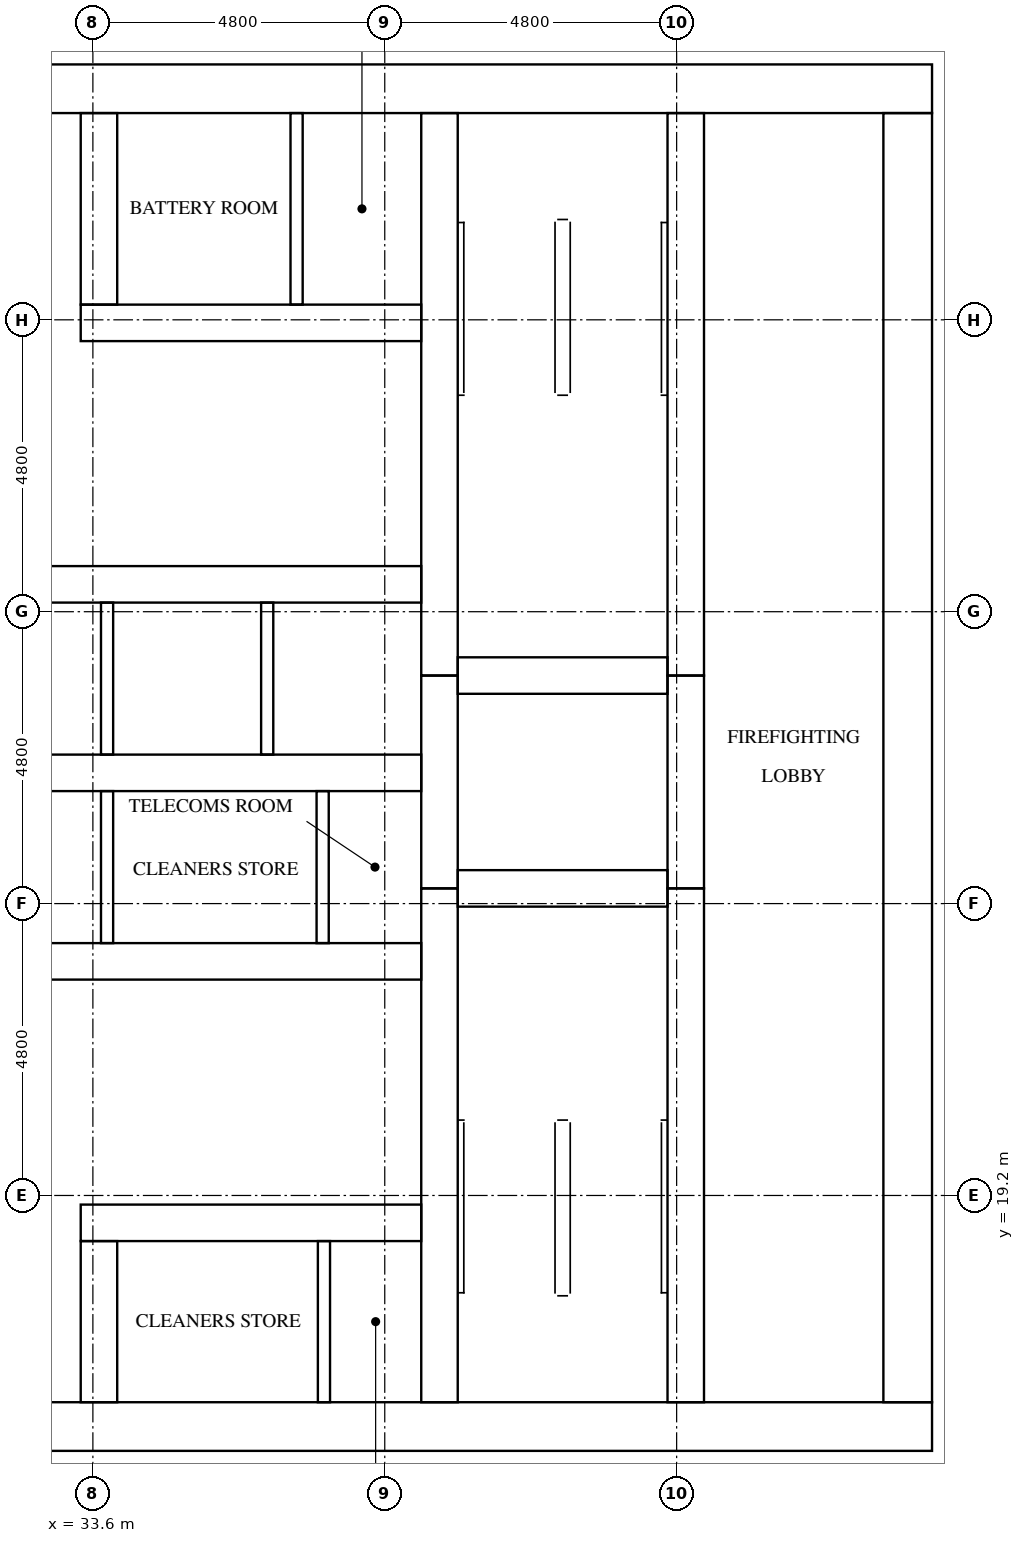
"""IFC4 building model, lengths in metres.
Left out: names, types, materials, properties, quantities, classifications, styles, units other than length and angle.
Written with IfcOpenShell. Run it as: python <this file> out.ifc"""

import sys

from ifc_helpers import new_model, si_unit, direction, frame, frame_2d, origin, place, context, subcontext, project, spatial, rectangle, extrude, element, fill, save


model = new_model("IFC4")
c1 = context("Model", 3, precision=1e-05, world=origin(), true_north=direction((0.0, 1.0)))
c2 = subcontext(c1, "Body", "Model", "MODEL_VIEW")
j1 = project(units=[si_unit("LENGTHUNIT", "METRE"), si_unit("PLANEANGLEUNIT", "RADIAN")], contexts=[c1])
p1 = place(None, origin())
s1 = spatial("IfcSite", under=j1, at=p1, CompositionType="ELEMENT")
p2 = place(p1, origin())
s2 = spatial("IfcBuilding", under=s1, at=p2, CompositionType="ELEMENT")
p3 = place(p2, frame((0.0, 0.0, 159.5)))
s3 = spatial("IfcBuildingStorey", under=s2, at=p3, CompositionType="ELEMENT", Elevation=159.5)
p4 = place(p3, frame((15.0, 15.4, 0.0), z_axis=(0.0, 0.0, 1.0), x_axis=(1.0, 0.0, 0.0)))
e1 = element("IfcWall", 1, at=p4, inside=s3, PredefinedType="SHEAR", context=c2, shape_type="SweptSolid", body=[
    extrude(rectangle(XDim=32.4, YDim=0.8, at=frame_2d((16.2, 0.0))), origin(), (0.0, 0.0, 1.0), 3.2),
])
p5 = place(p4, frame((15.3, 0.0, 0.0)))
e2 = element("IfcOpeningElement", 2, at=p5, cuts=e1, PredefinedType="OPENING", context=c2, shape_type="SweptSolid", body=[
    extrude(rectangle(XDim=1.8, YDim=2.1, at=frame_2d((0.9, 1.05))), frame((0.0, 0.41, 0.0), z_axis=(0.0, -1.0, 0.0), x_axis=(1.0, 0.0, 0.0)), (0.0, 0.0, 1.0), 0.82),
])
p6 = place(p3, frame((15.0, 37.4, 0.0), z_axis=(0.0, 0.0, 1.0), x_axis=(1.0, 0.0, 0.0)))
e3 = element("IfcWall", 3, at=p6, inside=s3, PredefinedType="SHEAR", context=c2, shape_type="SweptSolid", body=[
    extrude(rectangle(XDim=32.4, YDim=0.8, at=frame_2d((16.2, 0.0))), origin(), (0.0, 0.0, 1.0), 3.2),
])
p7 = place(p6, frame((15.3, 0.0, 0.0)))
e4 = element("IfcOpeningElement", 4, at=p7, cuts=e3, PredefinedType="OPENING", context=c2, shape_type="SweptSolid", body=[
    extrude(rectangle(XDim=1.8, YDim=2.1, at=frame_2d((0.9, 1.05))), frame((0.0, 0.41, 0.0), z_axis=(0.0, -1.0, 0.0), x_axis=(1.0, 0.0, 0.0)), (0.0, 0.0, 1.0), 0.82),
])
p8 = place(p6, frame((1.51, 0.0, 0.0)))
e5 = element("IfcOpeningElement", 5, at=p8, cuts=e3, PredefinedType="OPENING", context=c2, shape_type="SweptSolid", body=[
    extrude(rectangle(XDim=1.0, YDim=2.1, at=frame_2d((0.5, 1.05))), frame((0.0, 0.41, 0.0), z_axis=(0.0, -1.0, 0.0), x_axis=(1.0, 0.0, 0.0)), (0.0, 0.0, 1.0), 0.82),
])
p9 = place(p6, frame((5.11, 0.0, 0.0)))
e6 = element("IfcOpeningElement", 6, at=p9, cuts=e3, PredefinedType="OPENING", context=c2, shape_type="SweptSolid", body=[
    extrude(rectangle(XDim=1.0, YDim=2.1, at=frame_2d((0.5, 1.05))), frame((0.0, 0.41, 0.0), z_axis=(0.0, -1.0, 0.0), x_axis=(1.0, 0.0, 0.0)), (0.0, 0.0, 1.0), 0.82),
])
p10 = place(p3, frame((47.0, 15.8, 0.0), z_axis=(0.0, 0.0, 1.0), x_axis=(0.0, 1.0, 0.0)))
e7 = element("IfcWall", 7, at=p10, inside=s3, PredefinedType="SHEAR", context=c2, shape_type="SweptSolid", body=[
    extrude(rectangle(XDim=21.2, YDim=0.8, at=frame_2d((10.6, 0.0))), origin(), (0.0, 0.0, 1.0), 3.2),
])
p11 = place(p10, frame((10.3, 0.0, 0.0)))
e8 = element("IfcOpeningElement", 8, at=p11, cuts=e7, PredefinedType="OPENING", context=c2, shape_type="SweptSolid", body=[
    extrude(rectangle(XDim=1.2, YDim=2.1, at=frame_2d((0.6, 1.05))), frame((0.0, 0.41, 0.0), z_axis=(0.0, -1.0, 0.0), x_axis=(1.0, 0.0, 0.0)), (0.0, 0.0, 1.0), 0.82),
])
p12 = place(p3, frame((39.3, 15.8, 0.0), z_axis=(0.0, 0.0, 1.0), x_axis=(0.0, 1.0, 0.0)))
e9 = element("IfcWall", 9, at=p12, inside=s3, PredefinedType="SHEAR", context=c2, shape_type="SweptSolid", body=[
    extrude(rectangle(XDim=8.45, YDim=0.6, at=frame_2d((4.225, 0.0))), origin(), (0.0, 0.0, 1.0), 3.2),
])
p13 = place(p3, frame((39.3, 24.25, 0.0), z_axis=(0.0, 0.0, 1.0), x_axis=(0.0, 1.0, 0.0)))
e10 = element("IfcWall", 10, at=p13, inside=s3, PredefinedType="SHEAR", context=c2, shape_type="SweptSolid", body=[
    extrude(rectangle(XDim=3.5, YDim=0.6, at=frame_2d((1.75, 0.0))), origin(), (0.0, 0.0, 1.0), 3.2),
])
p14 = place(p3, frame((39.3, 27.75, 0.0), z_axis=(0.0, 0.0, 1.0), x_axis=(0.0, 1.0, 0.0)))
e11 = element("IfcWall", 11, at=p14, inside=s3, PredefinedType="SHEAR", context=c2, shape_type="SweptSolid", body=[
    extrude(rectangle(XDim=9.25, YDim=0.6, at=frame_2d((4.625, 0.0))), origin(), (0.0, 0.0, 1.0), 3.2),
])
p15 = place(p3, frame((43.35, 15.8, 0.0), z_axis=(0.0, 0.0, 1.0), x_axis=(0.0, 1.0, 0.0)))
e12 = element("IfcWall", 12, at=p15, inside=s3, PredefinedType="SHEAR", context=c2, shape_type="SweptSolid", body=[
    extrude(rectangle(XDim=8.45, YDim=0.6, at=frame_2d((4.225, 0.0))), origin(), (0.0, 0.0, 1.0), 3.2),
])
p16 = place(p15, frame((0.4, 0.0, 0.0)))
e13 = element("IfcOpeningElement", 13, at=p16, cuts=e12, PredefinedType="OPENING", context=c2, shape_type="SweptSolid", body=[
    extrude(rectangle(XDim=1.2, YDim=2.1, at=frame_2d((0.6, 1.05))), frame((0.0, 0.31, 0.0), z_axis=(0.0, -1.0, 0.0), x_axis=(1.0, 0.0, 0.0)), (0.0, 0.0, 1.0), 0.62),
])
p17 = place(p3, frame((43.35, 24.25, 0.0), z_axis=(0.0, 0.0, 1.0), x_axis=(0.0, 1.0, 0.0)))
e14 = element("IfcWall", 14, at=p17, inside=s3, PredefinedType="SHEAR", context=c2, shape_type="SweptSolid", body=[
    extrude(rectangle(XDim=3.5, YDim=0.6, at=frame_2d((1.75, 0.0))), origin(), (0.0, 0.0, 1.0), 3.2),
])
p18 = place(p17, frame((1.2, 0.0, 0.0)))
e15 = element("IfcOpeningElement", 15, at=p18, cuts=e14, PredefinedType="OPENING", context=c2, shape_type="SweptSolid", body=[
    extrude(rectangle(XDim=1.1, YDim=2.1, at=frame_2d((0.55, 1.05))), frame((0.0, 0.31, 0.0), z_axis=(0.0, -1.0, 0.0), x_axis=(1.0, 0.0, 0.0)), (0.0, 0.0, 1.0), 0.62),
])
p19 = place(p3, frame((43.35, 27.75, 0.0), z_axis=(0.0, 0.0, 1.0), x_axis=(0.0, 1.0, 0.0)))
e16 = element("IfcWall", 16, at=p19, inside=s3, PredefinedType="SHEAR", context=c2, shape_type="SweptSolid", body=[
    extrude(rectangle(XDim=9.25, YDim=0.6, at=frame_2d((4.625, 0.0))), origin(), (0.0, 0.0, 1.0), 3.2),
])
p20 = place(p19, frame((7.65, 0.0, 0.0)))
e17 = element("IfcOpeningElement", 17, at=p20, cuts=e16, PredefinedType="OPENING", context=c2, shape_type="SweptSolid", body=[
    extrude(rectangle(XDim=1.2, YDim=2.1, at=frame_2d((0.6, 1.05))), frame((0.0, 0.31, 0.0), z_axis=(0.0, -1.0, 0.0), x_axis=(1.0, 0.0, 0.0)), (0.0, 0.0, 1.0), 0.62),
])
for number, where, z_axis, x_axis in (
    (18, (39.6, 24.25, 0.0), (0.0, 0.0, 1.0), (1.0, 0.0, 0.0)),
    (19, (39.6, 27.75, 0.0), (0.0, 0.0, 1.0), (1.0, 0.0, 0.0)),
):
    element("IfcWall", number, at=place(p3, frame(where, z_axis=z_axis, x_axis=x_axis)), inside=s3, PredefinedType="SHEAR", context=c2, shape_type="SweptSolid", body=[
        extrude(rectangle(XDim=3.45, YDim=0.6, at=frame_2d((1.725, 0.0))), origin(), (0.0, 0.0, 1.0), 3.2),
    ])
p21 = place(p3, frame((33.4, 18.75, 0.0), z_axis=(0.0, 0.0, 1.0), x_axis=(1.0, 0.0, 0.0)))
e20 = element("IfcWall", 20, at=p21, inside=s3, PredefinedType="SHEAR", context=c2, shape_type="SweptSolid", body=[
    extrude(rectangle(XDim=5.6, YDim=0.6, at=frame_2d((2.8, 0.0))), origin(), (0.0, 0.0, 1.0), 3.2),
])
p22 = place(p21, frame((1.75, 0.0, 0.0)))
e21 = element("IfcOpeningElement", 21, at=p22, cuts=e20, PredefinedType="OPENING", context=c2, shape_type="SweptSolid", body=[
    extrude(rectangle(XDim=1.0, YDim=2.1, at=frame_2d((0.5, 1.05))), frame((0.0, 0.31, 0.0), z_axis=(0.0, -1.0, 0.0), x_axis=(1.0, 0.0, 0.0)), (0.0, 0.0, 1.0), 0.62),
])
p23 = place(p21, frame((4.35, 0.0, 0.0)))
e22 = element("IfcOpeningElement", 22, at=p23, cuts=e20, PredefinedType="OPENING", context=c2, shape_type="SweptSolid", body=[
    extrude(rectangle(XDim=1.0, YDim=2.1, at=frame_2d((0.5, 1.05))), frame((0.0, 0.31, 0.0), z_axis=(0.0, -1.0, 0.0), x_axis=(1.0, 0.0, 0.0)), (0.0, 0.0, 1.0), 0.62),
])
p24 = place(p3, frame((23.4, 23.05, 0.0), z_axis=(0.0, 0.0, 1.0), x_axis=(1.0, 0.0, 0.0)))
e23 = element("IfcWall", 23, at=p24, inside=s3, PredefinedType="SHEAR", context=c2, shape_type="SweptSolid", body=[
    extrude(rectangle(XDim=15.6, YDim=0.6, at=frame_2d((7.8, 0.0))), origin(), (0.0, 0.0, 1.0), 3.2),
])
p25 = place(p24, frame((2.033, 0.0, 0.0)))
e24 = element("IfcOpeningElement", 24, at=p25, cuts=e23, PredefinedType="OPENING", context=c2, shape_type="SweptSolid", body=[
    extrude(rectangle(XDim=1.0, YDim=2.1, at=frame_2d((0.5, 1.05))), frame((0.0, 0.31, 0.0), z_axis=(0.0, -1.0, 0.0), x_axis=(1.0, 0.0, 0.0)), (0.0, 0.0, 1.0), 0.62),
])
p26 = place(p24, frame((11.706, 0.0, 0.0)))
e25 = element("IfcOpeningElement", 25, at=p26, cuts=e23, PredefinedType="OPENING", context=c2, shape_type="SweptSolid", body=[
    extrude(rectangle(XDim=1.0, YDim=2.1, at=frame_2d((0.5, 1.05))), frame((0.0, 0.31, 0.0), z_axis=(0.0, -1.0, 0.0), x_axis=(1.0, 0.0, 0.0)), (0.0, 0.0, 1.0), 0.62),
])
p27 = place(p24, frame((14.339, 0.0, 0.0)))
e26 = element("IfcOpeningElement", 26, at=p27, cuts=e23, PredefinedType="OPENING", context=c2, shape_type="SweptSolid", body=[
    extrude(rectangle(XDim=1.0, YDim=2.1, at=frame_2d((0.5, 1.05))), frame((0.0, 0.31, 0.0), z_axis=(0.0, -1.0, 0.0), x_axis=(1.0, 0.0, 0.0)), (0.0, 0.0, 1.0), 0.62),
])
p28 = place(p3, frame((23.4, 26.15, 0.0), z_axis=(0.0, 0.0, 1.0), x_axis=(1.0, 0.0, 0.0)))
e27 = element("IfcWall", 27, at=p28, inside=s3, PredefinedType="SHEAR", context=c2, shape_type="SweptSolid", body=[
    extrude(rectangle(XDim=15.6, YDim=0.6, at=frame_2d((7.8, 0.0))), origin(), (0.0, 0.0, 1.0), 3.2),
])
p29 = place(p3, frame((23.4, 29.25, 0.0), z_axis=(0.0, 0.0, 1.0), x_axis=(1.0, 0.0, 0.0)))
e28 = element("IfcWall", 28, at=p29, inside=s3, PredefinedType="SHEAR", context=c2, shape_type="SweptSolid", body=[
    extrude(rectangle(XDim=15.6, YDim=0.6, at=frame_2d((7.8, 0.0))), origin(), (0.0, 0.0, 1.0), 3.2),
])
p30 = place(p29, frame((0.667, 0.0, 0.0)))
e29 = element("IfcOpeningElement", 29, at=p30, cuts=e28, PredefinedType="OPENING", context=c2, shape_type="SweptSolid", body=[
    extrude(rectangle(XDim=1.1, YDim=2.1, at=frame_2d((0.55, 1.05))), frame((0.0, 0.31, 0.0), z_axis=(0.0, -1.0, 0.0), x_axis=(1.0, 0.0, 0.0)), (0.0, 0.0, 1.0), 0.62),
])
p31 = place(p29, frame((3.3, 0.0, 0.0)))
e30 = element("IfcOpeningElement", 30, at=p31, cuts=e28, PredefinedType="OPENING", context=c2, shape_type="SweptSolid", body=[
    extrude(rectangle(XDim=1.1, YDim=2.1, at=frame_2d((0.55, 1.05))), frame((0.0, 0.31, 0.0), z_axis=(0.0, -1.0, 0.0), x_axis=(1.0, 0.0, 0.0)), (0.0, 0.0, 1.0), 0.62),
])
p32 = place(p29, frame((5.933, 0.0, 0.0)))
e31 = element("IfcOpeningElement", 31, at=p32, cuts=e28, PredefinedType="OPENING", context=c2, shape_type="SweptSolid", body=[
    extrude(rectangle(XDim=1.1, YDim=2.1, at=frame_2d((0.55, 1.05))), frame((0.0, 0.31, 0.0), z_axis=(0.0, -1.0, 0.0), x_axis=(1.0, 0.0, 0.0)), (0.0, 0.0, 1.0), 0.62),
])
p33 = place(p29, frame((8.567, 0.0, 0.0)))
e32 = element("IfcOpeningElement", 32, at=p33, cuts=e28, PredefinedType="OPENING", context=c2, shape_type="SweptSolid", body=[
    extrude(rectangle(XDim=1.1, YDim=2.1, at=frame_2d((0.55, 1.05))), frame((0.0, 0.31, 0.0), z_axis=(0.0, -1.0, 0.0), x_axis=(1.0, 0.0, 0.0)), (0.0, 0.0, 1.0), 0.62),
])
p34 = place(p29, frame((11.2, 0.0, 0.0)))
e33 = element("IfcOpeningElement", 33, at=p34, cuts=e28, PredefinedType="OPENING", context=c2, shape_type="SweptSolid", body=[
    extrude(rectangle(XDim=1.1, YDim=2.1, at=frame_2d((0.55, 1.05))), frame((0.0, 0.31, 0.0), z_axis=(0.0, -1.0, 0.0), x_axis=(1.0, 0.0, 0.0)), (0.0, 0.0, 1.0), 0.62),
])
p35 = place(p29, frame((13.833, 0.0, 0.0)))
e34 = element("IfcOpeningElement", 34, at=p35, cuts=e28, PredefinedType="OPENING", context=c2, shape_type="SweptSolid", body=[
    extrude(rectangle(XDim=1.1, YDim=2.1, at=frame_2d((0.55, 1.05))), frame((0.0, 0.31, 0.0), z_axis=(0.0, -1.0, 0.0), x_axis=(1.0, 0.0, 0.0)), (0.0, 0.0, 1.0), 0.62),
])
p36 = place(p3, frame((33.4, 33.55, 0.0), z_axis=(0.0, 0.0, 1.0), x_axis=(1.0, 0.0, 0.0)))
e35 = element("IfcWall", 35, at=p36, inside=s3, PredefinedType="SHEAR", context=c2, shape_type="SweptSolid", body=[
    extrude(rectangle(XDim=5.6, YDim=0.6, at=frame_2d((2.8, 0.0))), origin(), (0.0, 0.0, 1.0), 3.2),
])
p37 = place(p36, frame((1.525, 0.0, 0.0)))
e36 = element("IfcOpeningElement", 36, at=p37, cuts=e35, PredefinedType="OPENING", context=c2, shape_type="SweptSolid", body=[
    extrude(rectangle(XDim=1.0, YDim=2.1, at=frame_2d((0.5, 1.05))), frame((0.0, 0.31, 0.0), z_axis=(0.0, -1.0, 0.0), x_axis=(1.0, 0.0, 0.0)), (0.0, 0.0, 1.0), 0.62),
])
p38 = place(p36, frame((4.125, 0.0, 0.0)))
e37 = element("IfcOpeningElement", 37, at=p38, cuts=e35, PredefinedType="OPENING", context=c2, shape_type="SweptSolid", body=[
    extrude(rectangle(XDim=1.0, YDim=2.1, at=frame_2d((0.5, 1.05))), frame((0.0, 0.31, 0.0), z_axis=(0.0, -1.0, 0.0), x_axis=(1.0, 0.0, 0.0)), (0.0, 0.0, 1.0), 0.62),
])
p39 = place(p3, frame((33.7, 15.8, 0.0), z_axis=(0.0, 0.0, 1.0), x_axis=(0.0, 1.0, 0.0)))
e38 = element("IfcWall", 38, at=p39, inside=s3, PredefinedType="SHEAR", context=c2, shape_type="SweptSolid", body=[
    extrude(rectangle(XDim=2.65, YDim=0.6, at=frame_2d((1.325, 0.0))), origin(), (0.0, 0.0, 1.0), 3.2),
])
p40 = place(p3, frame((33.7, 33.85, 0.0), z_axis=(0.0, 0.0, 1.0), x_axis=(0.0, 1.0, 0.0)))
e39 = element("IfcWall", 39, at=p40, inside=s3, PredefinedType="SHEAR", context=c2, shape_type="SweptSolid", body=[
    extrude(rectangle(XDim=3.15, YDim=0.6, at=frame_2d((1.575, 0.0))), origin(), (0.0, 0.0, 1.0), 3.2),
])
for number, where, z_axis, x_axis in (
    (40, (33.833, 23.35, 0.0), (0.0, 0.0, 1.0), (0.0, 1.0, 0.0)),
    (41, (33.833, 26.45, 0.0), (0.0, 0.0, 1.0), (0.0, 1.0, 0.0)),
    (42, (36.467, 26.45, 0.0), (0.0, 0.0, 1.0), (0.0, 1.0, 0.0)),
):
    element("IfcWall", number, at=place(p3, frame(where, z_axis=z_axis, x_axis=x_axis)), inside=s3, PredefinedType="SOLIDWALL", context=c2, shape_type="SweptSolid", body=[
        extrude(rectangle(XDim=2.5, YDim=0.2, at=frame_2d((1.25, 0.0))), origin(), (0.0, 0.0, 1.0), 3.2),
    ])
p41 = place(p3, frame((37.379, 23.35, 0.0), z_axis=(0.0, 0.0, 1.0), x_axis=(0.0, 1.0, 0.0)))
e43 = element("IfcWall", 43, at=p41, inside=s3, PredefinedType="PARTITIONING", context=c2, shape_type="SweptSolid", body=[
    extrude(rectangle(XDim=2.5, YDim=0.2, at=frame_2d((1.25, 0.0))), origin(), (0.0, 0.0, 1.0), 3.2),
])
p42 = place(p3, frame((37.4, 15.8, 0.0), z_axis=(0.0, 0.0, 1.0), x_axis=(0.0, 1.0, 0.0)))
e44 = element("IfcWall", 44, at=p42, inside=s3, PredefinedType="PARTITIONING", context=c2, shape_type="SweptSolid", body=[
    extrude(rectangle(XDim=2.65, YDim=0.2, at=frame_2d((1.325, 0.0))), origin(), (0.0, 0.0, 1.0), 3.2),
])
p43 = place(p3, frame((36.95, 33.85, 0.0), z_axis=(0.0, 0.0, 1.0), x_axis=(0.0, 1.0, 0.0)))
e45 = element("IfcWall", 45, at=p43, inside=s3, PredefinedType="PARTITIONING", context=c2, shape_type="SweptSolid", body=[
    extrude(rectangle(XDim=3.15, YDim=0.2, at=frame_2d((1.575, 0.0))), origin(), (0.0, 0.0, 1.0), 3.2),
])
p44 = place(p33, origin())
e46 = element("IfcDoor", 46, at=p44, inside=s3, OperationType="DOUBLE_DOOR_SLIDING", PredefinedType="DOOR", context=c2, shape_type="SweptSolid", body=[
    extrude(rectangle(XDim=1.1, YDim=2.1, at=frame_2d((0.55, 1.05))), frame((0.0, 0.025, 0.0), z_axis=(0.0, -1.0, 0.0), x_axis=(1.0, 0.0, 0.0)), (0.0, 0.0, 1.0), 0.05),
])
fill(e32, e46)
p45 = place(p34, origin())
e47 = element("IfcDoor", 47, at=p45, inside=s3, OperationType="DOUBLE_DOOR_SLIDING", PredefinedType="DOOR", context=c2, shape_type="SweptSolid", body=[
    extrude(rectangle(XDim=1.1, YDim=2.1, at=frame_2d((0.55, 1.05))), frame((0.0, 0.025, 0.0), z_axis=(0.0, -1.0, 0.0), x_axis=(1.0, 0.0, 0.0)), (0.0, 0.0, 1.0), 0.05),
])
fill(e33, e47)
p46 = place(p35, origin())
e48 = element("IfcDoor", 48, at=p46, inside=s3, OperationType="DOUBLE_DOOR_SLIDING", PredefinedType="DOOR", context=c2, shape_type="SweptSolid", body=[
    extrude(rectangle(XDim=1.1, YDim=2.1, at=frame_2d((0.55, 1.05))), frame((0.0, 0.025, 0.0), z_axis=(0.0, -1.0, 0.0), x_axis=(1.0, 0.0, 0.0)), (0.0, 0.0, 1.0), 0.05),
])
fill(e34, e48)
p47 = place(p18, origin())
e49 = element("IfcDoor", 49, at=p47, inside=s3, OperationType="DOUBLE_DOOR_SLIDING", PredefinedType="DOOR", context=c2, shape_type="SweptSolid", body=[
    extrude(rectangle(XDim=1.1, YDim=2.1, at=frame_2d((0.55, 1.05))), frame((0.0, 0.025, 0.0), z_axis=(0.0, -1.0, 0.0), x_axis=(1.0, 0.0, 0.0)), (0.0, 0.0, 1.0), 0.05),
])
fill(e15, e49)
p48 = place(p16, origin())
e50 = element("IfcDoor", 50, at=p48, inside=s3, OperationType="SINGLE_SWING_RIGHT", PredefinedType="DOOR", context=c2, shape_type="SweptSolid", body=[
    extrude(rectangle(XDim=1.2, YDim=2.1, at=frame_2d((0.6, 1.05))), frame((0.0, 0.025, 0.0), z_axis=(0.0, -1.0, 0.0), x_axis=(1.0, 0.0, 0.0)), (0.0, 0.0, 1.0), 0.05),
])
fill(e13, e50)
p49 = place(p20, origin())
e51 = element("IfcDoor", 51, at=p49, inside=s3, OperationType="SINGLE_SWING_LEFT", PredefinedType="DOOR", context=c2, shape_type="SweptSolid", body=[
    extrude(rectangle(XDim=1.2, YDim=2.1, at=frame_2d((0.6, 1.05))), frame((0.0, 0.025, 0.0), z_axis=(0.0, -1.0, 0.0), x_axis=(1.0, 0.0, 0.0)), (0.0, 0.0, 1.0), 0.05),
])
fill(e17, e51)
p50 = place(p11, origin())
e52 = element("IfcDoor", 52, at=p50, inside=s3, OperationType="SINGLE_SWING_LEFT", PredefinedType="DOOR", context=c2, shape_type="SweptSolid", body=[
    extrude(rectangle(XDim=1.2, YDim=2.1, at=frame_2d((0.6, 1.05))), frame((0.0, 0.025, 0.0), z_axis=(0.0, -1.0, 0.0), x_axis=(1.0, 0.0, 0.0)), (0.0, 0.0, 1.0), 0.05),
])
fill(e8, e52)
p51 = place(p26, frame((1.0, 0.0, 0.0), z_axis=(0.0, 0.0, 1.0), x_axis=(-1.0, 0.0, 0.0)))
e53 = element("IfcDoor", 53, at=p51, inside=s3, OperationType="SINGLE_SWING_LEFT", PredefinedType="DOOR", context=c2, shape_type="SweptSolid", body=[
    extrude(rectangle(XDim=1.0, YDim=2.1, at=frame_2d((0.5, 1.05))), frame((0.0, 0.025, 0.0), z_axis=(0.0, -1.0, 0.0), x_axis=(1.0, 0.0, 0.0)), (0.0, 0.0, 1.0), 0.05),
])
fill(e25, e53)
p52 = place(p27, frame((1.0, 0.0, 0.0), z_axis=(0.0, 0.0, 1.0), x_axis=(-1.0, 0.0, 0.0)))
e54 = element("IfcDoor", 54, at=p52, inside=s3, OperationType="SINGLE_SWING_RIGHT", PredefinedType="DOOR", context=c2, shape_type="SweptSolid", body=[
    extrude(rectangle(XDim=1.0, YDim=2.1, at=frame_2d((0.5, 1.05))), frame((0.0, 0.025, 0.0), z_axis=(0.0, -1.0, 0.0), x_axis=(1.0, 0.0, 0.0)), (0.0, 0.0, 1.0), 0.05),
])
fill(e26, e54)
p53 = place(p22, origin())
e55 = element("IfcDoor", 55, at=p53, inside=s3, OperationType="SINGLE_SWING_LEFT", PredefinedType="DOOR", context=c2, shape_type="SweptSolid", body=[
    extrude(rectangle(XDim=1.0, YDim=2.1, at=frame_2d((0.5, 1.05))), frame((0.0, 0.025, 0.0), z_axis=(0.0, -1.0, 0.0), x_axis=(1.0, 0.0, 0.0)), (0.0, 0.0, 1.0), 0.05),
])
fill(e21, e55)
p54 = place(p23, origin())
e56 = element("IfcDoor", 56, at=p54, inside=s3, OperationType="SINGLE_SWING_RIGHT", PredefinedType="DOOR", context=c2, shape_type="SweptSolid", body=[
    extrude(rectangle(XDim=1.0, YDim=2.1, at=frame_2d((0.5, 1.05))), frame((0.0, 0.025, 0.0), z_axis=(0.0, -1.0, 0.0), x_axis=(1.0, 0.0, 0.0)), (0.0, 0.0, 1.0), 0.05),
])
fill(e22, e56)
p55 = place(p37, frame((1.0, 0.0, 0.0), z_axis=(0.0, 0.0, 1.0), x_axis=(-1.0, 0.0, 0.0)))
e57 = element("IfcDoor", 57, at=p55, inside=s3, OperationType="SINGLE_SWING_LEFT", PredefinedType="DOOR", context=c2, shape_type="SweptSolid", body=[
    extrude(rectangle(XDim=1.0, YDim=2.1, at=frame_2d((0.5, 1.05))), frame((0.0, 0.025, 0.0), z_axis=(0.0, -1.0, 0.0), x_axis=(1.0, 0.0, 0.0)), (0.0, 0.0, 1.0), 0.05),
])
fill(e36, e57)
p56 = place(p38, frame((1.0, 0.0, 0.0), z_axis=(0.0, 0.0, 1.0), x_axis=(-1.0, 0.0, 0.0)))
e58 = element("IfcDoor", 58, at=p56, inside=s3, OperationType="SINGLE_SWING_RIGHT", PredefinedType="DOOR", context=c2, shape_type="SweptSolid", body=[
    extrude(rectangle(XDim=1.0, YDim=2.1, at=frame_2d((0.5, 1.05))), frame((0.0, 0.025, 0.0), z_axis=(0.0, -1.0, 0.0), x_axis=(1.0, 0.0, 0.0)), (0.0, 0.0, 1.0), 0.05),
])
fill(e37, e58)
save(model, sys.argv[1])
